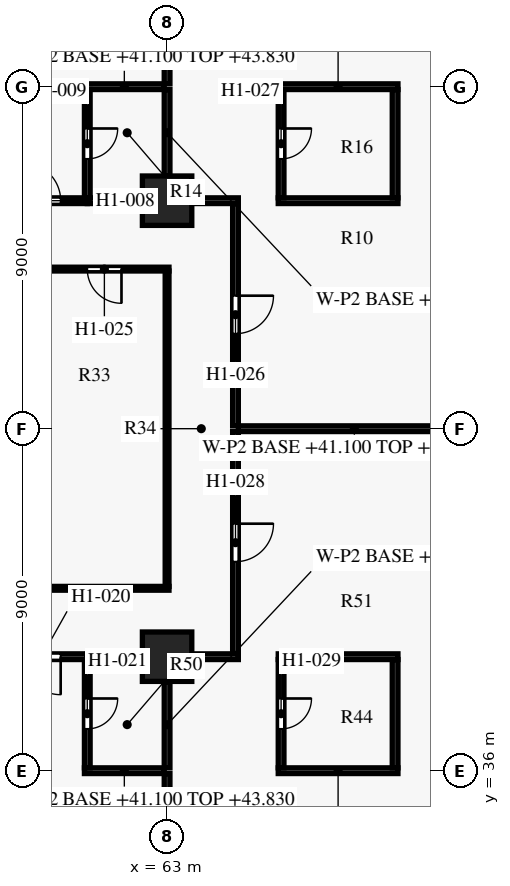
"""IFC4 building model, lengths in metres.
Left out: names, types, materials, properties, quantities, classifications, styles, units other than length and angle.
Written with IfcOpenShell. Run it as: python <this file> out.ifc"""

import sys

from ifc_helpers import new_model, si_unit, direction, frame, frame_2d, origin, origin_2d, place, context, subcontext, project, spatial, rectangle, extrude, element, fill, save


model = new_model("IFC4")
c1 = context("Model", 3, precision=1e-05, world=origin(), true_north=direction((0.0, 1.0)))
c2 = subcontext(c1, "Body", "Model", "MODEL_VIEW")
j1 = project(units=[si_unit("LENGTHUNIT", "METRE"), si_unit("PLANEANGLEUNIT", "RADIAN")], contexts=[c1])
p1 = place(None, origin())
s1 = spatial("IfcSite", under=j1, at=p1, CompositionType="ELEMENT")
p2 = place(p1, origin())
s2 = spatial("IfcBuilding", under=s1, at=p2, CompositionType="ELEMENT")
p3 = place(p2, frame((0.0, 0.0, 41.1)))
s3 = spatial("IfcBuildingStorey", under=s2, at=p3, CompositionType="ELEMENT", Elevation=41.1)
for number, where, z_axis, x_axis in (
    (1, (63.0, 39.0, 0.0), (0.0, 0.0, 1.0), (1.0, 0.0, 0.0)),
    (2, (63.0, 51.0, 0.0), (0.0, 0.0, 1.0), (1.0, 0.0, 0.0)),
):
    element("IfcColumn", number, at=place(p3, frame(where, z_axis=z_axis, x_axis=x_axis)), inside=s3, PredefinedType="COLUMN", context=c2, shape_type="SweptSolid", body=[
        extrude(rectangle(XDim=1.3, YDim=1.3, at=origin_2d()), origin(), (0.0, 0.0, 1.0), 3.6),
    ])
p4 = place(p3, frame((63.0, 35.925, 0.0), z_axis=(0.0, 0.0, 1.0), x_axis=(0.0, -1.0, 0.0)))
e3 = element("IfcWall", 3, at=p4, inside=s3, PredefinedType="PARTITIONING", context=c2, shape_type="SweptSolid", body=[
    extrude(rectangle(XDim=8.8, YDim=0.15, at=frame_2d((4.4, 0.0))), origin(), (0.0, 0.0, 1.0), 2.73),
])
p5 = place(p3, frame((60.825, 36.0, 0.0), z_axis=(0.0, 0.0, 1.0), x_axis=(1.0, 0.0, 0.0)))
e4 = element("IfcWall", 4, at=p5, inside=s3, PredefinedType="PARTITIONING", context=c2, shape_type="SweptSolid", body=[
    extrude(rectangle(XDim=2.1, YDim=0.15, at=frame_2d((1.05, 0.0))), origin(), (0.0, 0.0, 1.0), 2.73),
])
p6 = place(p3, frame((65.925, 36.0, 0.0), z_axis=(0.0, 0.0, 1.0), x_axis=(1.0, 0.0, 0.0)))
e5 = element("IfcWall", 5, at=p6, inside=s3, PredefinedType="PARTITIONING", context=c2, shape_type="SweptSolid", body=[
    extrude(rectangle(XDim=3.15, YDim=0.15, at=frame_2d((1.575, 0.0))), origin(), (0.0, 0.0, 1.0), 3.28),
])
p7 = place(p3, frame((69.0, 36.075, 0.0), z_axis=(0.0, 0.0, 1.0), x_axis=(0.0, 1.0, 0.0)))
e6 = element("IfcWall", 6, at=p7, inside=s3, PredefinedType="PARTITIONING", context=c2, shape_type="SweptSolid", body=[
    extrude(rectangle(XDim=2.85, YDim=0.15, at=frame_2d((1.425, 0.0))), origin(), (0.0, 0.0, 1.0), 2.58),
])
p8 = place(p3, frame((63.0, 38.345, 0.0), z_axis=(0.0, 0.0, 1.0), x_axis=(0.0, -1.0, 0.0)))
e7 = element("IfcWall", 7, at=p8, inside=s3, PredefinedType="PARTITIONING", context=c2, shape_type="SweptSolid", body=[
    extrude(rectangle(XDim=2.27, YDim=0.15, at=frame_2d((1.135, 0.0))), origin(), (0.0, 0.0, 1.0), 2.73),
])
p9 = place(p3, frame((60.9, 38.925, 0.0), z_axis=(0.0, 0.0, 1.0), x_axis=(0.0, -1.0, 0.0)))
e8 = element("IfcWall", 8, at=p9, inside=s3, PredefinedType="PARTITIONING", context=c2, shape_type="SweptSolid", body=[
    extrude(rectangle(XDim=2.85, YDim=0.15, at=frame_2d((1.425, 0.0))), origin(), (0.0, 0.0, 1.0), 2.58),
])
p10 = place(p9, frame((1.025, 0.0, 0.0)))
e9 = element("IfcOpeningElement", 9, at=p10, cuts=e8, PredefinedType="OPENING", context=c2, shape_type="SweptSolid", body=[
    extrude(rectangle(XDim=0.8, YDim=2.1, at=frame_2d((0.4, 1.05))), frame((0.0, 0.085, 0.0), z_axis=(0.0, -1.0, 0.0), x_axis=(1.0, 0.0, 0.0)), (0.0, 0.0, 1.0), 0.17),
])
p11 = place(p3, frame((66.0, 38.925, 0.0), z_axis=(0.0, 0.0, 1.0), x_axis=(0.0, -1.0, 0.0)))
e10 = element("IfcWall", 10, at=p11, inside=s3, PredefinedType="PARTITIONING", context=c2, shape_type="SweptSolid", body=[
    extrude(rectangle(XDim=2.85, YDim=0.15, at=frame_2d((1.425, 0.0))), origin(), (0.0, 0.0, 1.0), 2.58),
])
p12 = place(p11, frame((1.025, 0.0, 0.0)))
e11 = element("IfcOpeningElement", 11, at=p12, cuts=e10, PredefinedType="OPENING", context=c2, shape_type="SweptSolid", body=[
    extrude(rectangle(XDim=0.8, YDim=2.1, at=frame_2d((0.4, 1.05))), frame((0.0, 0.085, 0.0), z_axis=(0.0, -1.0, 0.0), x_axis=(1.0, 0.0, 0.0)), (0.0, 0.0, 1.0), 0.17),
])
p13 = place(p3, frame((60.9, 39.0, 0.0), z_axis=(0.0, 0.0, 1.0), x_axis=(-1.0, 0.0, 0.0)))
e12 = element("IfcWall", 12, at=p13, inside=s3, PredefinedType="PARTITIONING", context=c2, shape_type="SweptSolid", body=[
    extrude(rectangle(XDim=2.4, YDim=0.15, at=frame_2d((1.2, 0.0))), origin(), (0.0, 0.0, 1.0), 2.58),
])
p14 = place(p13, frame((0.7, 0.0, 0.0)))
e13 = element("IfcOpeningElement", 13, at=p14, cuts=e12, PredefinedType="OPENING", context=c2, shape_type="SweptSolid", body=[
    extrude(rectangle(XDim=1.0, YDim=2.1, at=frame_2d((0.5, 1.05))), frame((0.0, 0.085, 0.0), z_axis=(0.0, -1.0, 0.0), x_axis=(1.0, 0.0, 0.0)), (0.0, 0.0, 1.0), 0.17),
])
p15 = place(p3, frame((62.345, 39.0, 0.0), z_axis=(0.0, 0.0, 1.0), x_axis=(-1.0, 0.0, 0.0)))
e14 = element("IfcWall", 14, at=p15, inside=s3, PredefinedType="PARTITIONING", context=c2, shape_type="SweptSolid", body=[
    extrude(rectangle(XDim=1.445, YDim=0.15, at=frame_2d((0.723, 0.0))), origin(), (0.0, 0.0, 1.0), 2.58),
])
p16 = place(p3, frame((64.875, 39.0, 0.0), z_axis=(0.0, 0.0, 1.0), x_axis=(-1.0, 0.0, 0.0)))
e15 = element("IfcWall", 15, at=p16, inside=s3, PredefinedType="PARTITIONING", context=c2, shape_type="SweptSolid", body=[
    extrude(rectangle(XDim=1.22, YDim=0.15, at=frame_2d((0.61, 0.0))), origin(), (0.0, 0.0, 1.0), 2.58),
])
p17 = place(p3, frame((69.075, 39.0, 0.0), z_axis=(0.0, 0.0, 1.0), x_axis=(-1.0, 0.0, 0.0)))
e16 = element("IfcWall", 16, at=p17, inside=s3, PredefinedType="PARTITIONING", context=c2, shape_type="SweptSolid", body=[
    extrude(rectangle(XDim=3.15, YDim=0.15, at=frame_2d((1.575, 0.0))), origin(), (0.0, 0.0, 1.0), 2.58),
])
p18 = place(p3, frame((59.7, 40.8, 0.0), z_axis=(0.0, 0.0, 1.0), x_axis=(1.0, 0.0, 0.0)))
e17 = element("IfcWall", 17, at=p18, inside=s3, PredefinedType="PARTITIONING", context=c2, shape_type="SweptSolid", body=[
    extrude(rectangle(XDim=3.35, YDim=0.1, at=frame_2d((1.675, 0.0))), origin(), (0.0, 0.0, 1.0), 2.73),
])
p19 = place(p3, frame((63.0, 40.85, 0.0), z_axis=(0.0, 0.0, 1.0), x_axis=(0.0, 1.0, 0.0)))
e18 = element("IfcWall", 18, at=p19, inside=s3, PredefinedType="PARTITIONING", context=c2, shape_type="SweptSolid", body=[
    extrude(rectangle(XDim=8.3, YDim=0.1, at=frame_2d((4.15, 0.0))), origin(), (0.0, 0.0, 1.0), 2.73),
])
p20 = place(p3, frame((64.8, 44.925, 0.0), z_axis=(0.0, 0.0, 1.0), x_axis=(0.0, -1.0, 0.0)))
e19 = element("IfcWall", 19, at=p20, inside=s3, PredefinedType="PARTITIONING", context=c2, shape_type="SweptSolid", body=[
    extrude(rectangle(XDim=5.85, YDim=0.15, at=frame_2d((2.925, 0.0))), origin(), (0.0, 0.0, 1.0), 2.58),
])
p21 = place(p20, frame((2.425, 0.0, 0.0)))
e20 = element("IfcOpeningElement", 20, at=p21, cuts=e19, PredefinedType="OPENING", context=c2, shape_type="SweptSolid", body=[
    extrude(rectangle(XDim=1.0, YDim=2.1, at=frame_2d((0.5, 1.05))), frame((0.0, 0.085, 0.0), z_axis=(0.0, -1.0, 0.0), x_axis=(1.0, 0.0, 0.0)), (0.0, 0.0, 1.0), 0.17),
])
p22 = place(p3, frame((70.98, 45.0, 0.0), z_axis=(0.0, 0.0, 1.0), x_axis=(-1.0, 0.0, 0.0)))
e21 = element("IfcWall", 21, at=p22, inside=s3, PredefinedType="PARTITIONING", context=c2, shape_type="SweptSolid", body=[
    extrude(rectangle(XDim=6.105, YDim=0.15, at=frame_2d((3.052, 0.0))), origin(), (0.0, 0.0, 1.0), 3.28),
])
p23 = place(p3, frame((63.05, 49.2, 0.0), z_axis=(0.0, 0.0, 1.0), x_axis=(-1.0, 0.0, 0.0)))
e22 = element("IfcWall", 22, at=p23, inside=s3, PredefinedType="PARTITIONING", context=c2, shape_type="SweptSolid", body=[
    extrude(rectangle(XDim=3.35, YDim=0.1, at=frame_2d((1.675, 0.0))), origin(), (0.0, 0.0, 1.0), 2.73),
])
p24 = place(p23, frame((1.25, 0.0, 0.0)))
e23 = element("IfcOpeningElement", 23, at=p24, cuts=e22, PredefinedType="OPENING", context=c2, shape_type="SweptSolid", body=[
    extrude(rectangle(XDim=0.9, YDim=2.1, at=frame_2d((0.45, 1.05))), frame((0.0, 0.06, 0.0), z_axis=(0.0, -1.0, 0.0), x_axis=(1.0, 0.0, 0.0)), (0.0, 0.0, 1.0), 0.12),
])
p25 = place(p3, frame((64.8, 50.925, 0.0), z_axis=(0.0, 0.0, 1.0), x_axis=(0.0, -1.0, 0.0)))
e24 = element("IfcWall", 24, at=p25, inside=s3, PredefinedType="PARTITIONING", context=c2, shape_type="SweptSolid", body=[
    extrude(rectangle(XDim=5.85, YDim=0.15, at=frame_2d((2.925, 0.0))), origin(), (0.0, 0.0, 1.0), 2.58),
])
p26 = place(p25, frame((2.425, 0.0, 0.0)))
e25 = element("IfcOpeningElement", 25, at=p26, cuts=e24, PredefinedType="OPENING", context=c2, shape_type="SweptSolid", body=[
    extrude(rectangle(XDim=1.0, YDim=2.1, at=frame_2d((0.5, 1.05))), frame((0.0, 0.085, 0.0), z_axis=(0.0, -1.0, 0.0), x_axis=(1.0, 0.0, 0.0)), (0.0, 0.0, 1.0), 0.17),
])
p27 = place(p3, frame((58.5, 51.0, 0.0), z_axis=(0.0, 0.0, 1.0), x_axis=(1.0, 0.0, 0.0)))
e26 = element("IfcWall", 26, at=p27, inside=s3, PredefinedType="PARTITIONING", context=c2, shape_type="SweptSolid", body=[
    extrude(rectangle(XDim=2.4, YDim=0.15, at=frame_2d((1.2, 0.0))), origin(), (0.0, 0.0, 1.0), 2.58),
])
p28 = place(p27, frame((0.7, 0.0, 0.0)))
e27 = element("IfcOpeningElement", 27, at=p28, cuts=e26, PredefinedType="OPENING", context=c2, shape_type="SweptSolid", body=[
    extrude(rectangle(XDim=1.0, YDim=2.1, at=frame_2d((0.5, 1.05))), frame((0.0, 0.085, 0.0), z_axis=(0.0, -1.0, 0.0), x_axis=(1.0, 0.0, 0.0)), (0.0, 0.0, 1.0), 0.17),
])
p29 = place(p3, frame((60.9, 51.0, 0.0), z_axis=(0.0, 0.0, 1.0), x_axis=(1.0, 0.0, 0.0)))
e28 = element("IfcWall", 28, at=p29, inside=s3, PredefinedType="PARTITIONING", context=c2, shape_type="SweptSolid", body=[
    extrude(rectangle(XDim=1.445, YDim=0.15, at=frame_2d((0.723, 0.0))), origin(), (0.0, 0.0, 1.0), 2.58),
])
p30 = place(p3, frame((63.655, 51.0, 0.0), z_axis=(0.0, 0.0, 1.0), x_axis=(1.0, 0.0, 0.0)))
e29 = element("IfcWall", 29, at=p30, inside=s3, PredefinedType="PARTITIONING", context=c2, shape_type="SweptSolid", body=[
    extrude(rectangle(XDim=1.22, YDim=0.15, at=frame_2d((0.61, 0.0))), origin(), (0.0, 0.0, 1.0), 2.58),
])
p31 = place(p3, frame((65.925, 51.0, 0.0), z_axis=(0.0, 0.0, 1.0), x_axis=(1.0, 0.0, 0.0)))
e30 = element("IfcWall", 30, at=p31, inside=s3, PredefinedType="PARTITIONING", context=c2, shape_type="SweptSolid", body=[
    extrude(rectangle(XDim=3.15, YDim=0.15, at=frame_2d((1.575, 0.0))), origin(), (0.0, 0.0, 1.0), 2.58),
])
p32 = place(p3, frame((69.0, 51.075, 0.0), z_axis=(0.0, 0.0, 1.0), x_axis=(0.0, 1.0, 0.0)))
e31 = element("IfcWall", 31, at=p32, inside=s3, PredefinedType="PARTITIONING", context=c2, shape_type="SweptSolid", body=[
    extrude(rectangle(XDim=2.85, YDim=0.15, at=frame_2d((1.425, 0.0))), origin(), (0.0, 0.0, 1.0), 2.58),
])
p33 = place(p3, frame((60.9, 53.925, 0.0), z_axis=(0.0, 0.0, 1.0), x_axis=(0.0, -1.0, 0.0)))
e32 = element("IfcWall", 32, at=p33, inside=s3, PredefinedType="PARTITIONING", context=c2, shape_type="SweptSolid", body=[
    extrude(rectangle(XDim=2.85, YDim=0.15, at=frame_2d((1.425, 0.0))), origin(), (0.0, 0.0, 1.0), 2.58),
])
p34 = place(p33, frame((1.025, 0.0, 0.0)))
e33 = element("IfcOpeningElement", 33, at=p34, cuts=e32, PredefinedType="OPENING", context=c2, shape_type="SweptSolid", body=[
    extrude(rectangle(XDim=0.8, YDim=2.1, at=frame_2d((0.4, 1.05))), frame((0.0, 0.085, 0.0), z_axis=(0.0, -1.0, 0.0), x_axis=(1.0, 0.0, 0.0)), (0.0, 0.0, 1.0), 0.17),
])
p35 = place(p3, frame((63.0, 53.925, 0.0), z_axis=(0.0, 0.0, 1.0), x_axis=(0.0, -1.0, 0.0)))
e34 = element("IfcWall", 34, at=p35, inside=s3, PredefinedType="PARTITIONING", context=c2, shape_type="SweptSolid", body=[
    extrude(rectangle(XDim=2.27, YDim=0.15, at=frame_2d((1.135, 0.0))), origin(), (0.0, 0.0, 1.0), 2.73),
])
p36 = place(p3, frame((66.0, 53.925, 0.0), z_axis=(0.0, 0.0, 1.0), x_axis=(0.0, -1.0, 0.0)))
e35 = element("IfcWall", 35, at=p36, inside=s3, PredefinedType="PARTITIONING", context=c2, shape_type="SweptSolid", body=[
    extrude(rectangle(XDim=2.85, YDim=0.15, at=frame_2d((1.425, 0.0))), origin(), (0.0, 0.0, 1.0), 2.58),
])
p37 = place(p36, frame((1.025, 0.0, 0.0)))
e36 = element("IfcOpeningElement", 36, at=p37, cuts=e35, PredefinedType="OPENING", context=c2, shape_type="SweptSolid", body=[
    extrude(rectangle(XDim=0.8, YDim=2.1, at=frame_2d((0.4, 1.05))), frame((0.0, 0.085, 0.0), z_axis=(0.0, -1.0, 0.0), x_axis=(1.0, 0.0, 0.0)), (0.0, 0.0, 1.0), 0.17),
])
p38 = place(p3, frame((62.925, 54.0, 0.0), z_axis=(0.0, 0.0, 1.0), x_axis=(-1.0, 0.0, 0.0)))
e37 = element("IfcWall", 37, at=p38, inside=s3, PredefinedType="PARTITIONING", context=c2, shape_type="SweptSolid", body=[
    extrude(rectangle(XDim=2.1, YDim=0.15, at=frame_2d((1.05, 0.0))), origin(), (0.0, 0.0, 1.0), 2.73),
])
p39 = place(p3, frame((69.075, 54.0, 0.0), z_axis=(0.0, 0.0, 1.0), x_axis=(-1.0, 0.0, 0.0)))
e38 = element("IfcWall", 38, at=p39, inside=s3, PredefinedType="PARTITIONING", context=c2, shape_type="SweptSolid", body=[
    extrude(rectangle(XDim=3.15, YDim=0.15, at=frame_2d((1.575, 0.0))), origin(), (0.0, 0.0, 1.0), 3.28),
])
p40 = place(p3, frame((63.0, 62.875, 0.0), z_axis=(0.0, 0.0, 1.0), x_axis=(0.0, -1.0, 0.0)))
e39 = element("IfcWall", 39, at=p40, inside=s3, PredefinedType="PARTITIONING", context=c2, shape_type="SweptSolid", body=[
    extrude(rectangle(XDim=8.8, YDim=0.15, at=frame_2d((4.4, 0.0))), origin(), (0.0, 0.0, 1.0), 2.73),
])
p41 = place(p28, origin())
e40 = element("IfcDoor", 40, at=p41, inside=s3, OperationType="SINGLE_SWING_LEFT", PredefinedType="DOOR", context=c2, shape_type="SweptSolid", body=[
    extrude(rectangle(XDim=1.0, YDim=2.1, at=frame_2d((0.5, 1.05))), frame((0.0, 0.025, 0.0), z_axis=(0.0, -1.0, 0.0), x_axis=(1.0, 0.0, 0.0)), (0.0, 0.0, 1.0), 0.05),
])
fill(e27, e40)
p42 = place(p34, origin())
e41 = element("IfcDoor", 41, at=p42, inside=s3, OperationType="SINGLE_SWING_LEFT", PredefinedType="DOOR", context=c2, shape_type="SweptSolid", body=[
    extrude(rectangle(XDim=0.8, YDim=2.1, at=frame_2d((0.4, 1.05))), frame((0.0, 0.025, 0.0), z_axis=(0.0, -1.0, 0.0), x_axis=(1.0, 0.0, 0.0)), (0.0, 0.0, 1.0), 0.05),
])
fill(e33, e41)
p43 = place(p14, origin())
e42 = element("IfcDoor", 42, at=p43, inside=s3, OperationType="SINGLE_SWING_LEFT", PredefinedType="DOOR", context=c2, shape_type="SweptSolid", body=[
    extrude(rectangle(XDim=1.0, YDim=2.1, at=frame_2d((0.5, 1.05))), frame((0.0, 0.025, 0.0), z_axis=(0.0, -1.0, 0.0), x_axis=(1.0, 0.0, 0.0)), (0.0, 0.0, 1.0), 0.05),
])
fill(e13, e42)
p44 = place(p10, origin())
e43 = element("IfcDoor", 43, at=p44, inside=s3, OperationType="SINGLE_SWING_LEFT", PredefinedType="DOOR", context=c2, shape_type="SweptSolid", body=[
    extrude(rectangle(XDim=0.8, YDim=2.1, at=frame_2d((0.4, 1.05))), frame((0.0, 0.025, 0.0), z_axis=(0.0, -1.0, 0.0), x_axis=(1.0, 0.0, 0.0)), (0.0, 0.0, 1.0), 0.05),
])
fill(e9, e43)
p45 = place(p24, origin())
e44 = element("IfcDoor", 44, at=p45, inside=s3, OperationType="SINGLE_SWING_LEFT", PredefinedType="DOOR", context=c2, shape_type="SweptSolid", body=[
    extrude(rectangle(XDim=0.9, YDim=2.1, at=frame_2d((0.45, 1.05))), frame((0.0, 0.025, 0.0), z_axis=(0.0, -1.0, 0.0), x_axis=(1.0, 0.0, 0.0)), (0.0, 0.0, 1.0), 0.05),
])
fill(e23, e44)
p46 = place(p26, origin())
e45 = element("IfcDoor", 45, at=p46, inside=s3, OperationType="SINGLE_SWING_LEFT", PredefinedType="DOOR", context=c2, shape_type="SweptSolid", body=[
    extrude(rectangle(XDim=1.0, YDim=2.1, at=frame_2d((0.5, 1.05))), frame((0.0, 0.025, 0.0), z_axis=(0.0, -1.0, 0.0), x_axis=(1.0, 0.0, 0.0)), (0.0, 0.0, 1.0), 0.05),
])
fill(e25, e45)
p47 = place(p37, origin())
e46 = element("IfcDoor", 46, at=p47, inside=s3, OperationType="SINGLE_SWING_RIGHT", PredefinedType="DOOR", context=c2, shape_type="SweptSolid", body=[
    extrude(rectangle(XDim=0.8, YDim=2.1, at=frame_2d((0.4, 1.05))), frame((0.0, 0.025, 0.0), z_axis=(0.0, -1.0, 0.0), x_axis=(1.0, 0.0, 0.0)), (0.0, 0.0, 1.0), 0.05),
])
fill(e36, e46)
p48 = place(p21, origin())
e47 = element("IfcDoor", 47, at=p48, inside=s3, OperationType="SINGLE_SWING_LEFT", PredefinedType="DOOR", context=c2, shape_type="SweptSolid", body=[
    extrude(rectangle(XDim=1.0, YDim=2.1, at=frame_2d((0.5, 1.05))), frame((0.0, 0.025, 0.0), z_axis=(0.0, -1.0, 0.0), x_axis=(1.0, 0.0, 0.0)), (0.0, 0.0, 1.0), 0.05),
])
fill(e20, e47)
p49 = place(p12, origin())
e48 = element("IfcDoor", 48, at=p49, inside=s3, OperationType="SINGLE_SWING_RIGHT", PredefinedType="DOOR", context=c2, shape_type="SweptSolid", body=[
    extrude(rectangle(XDim=0.8, YDim=2.1, at=frame_2d((0.4, 1.05))), frame((0.0, 0.025, 0.0), z_axis=(0.0, -1.0, 0.0), x_axis=(1.0, 0.0, 0.0)), (0.0, 0.0, 1.0), 0.05),
])
fill(e11, e48)
save(model, sys.argv[1])
